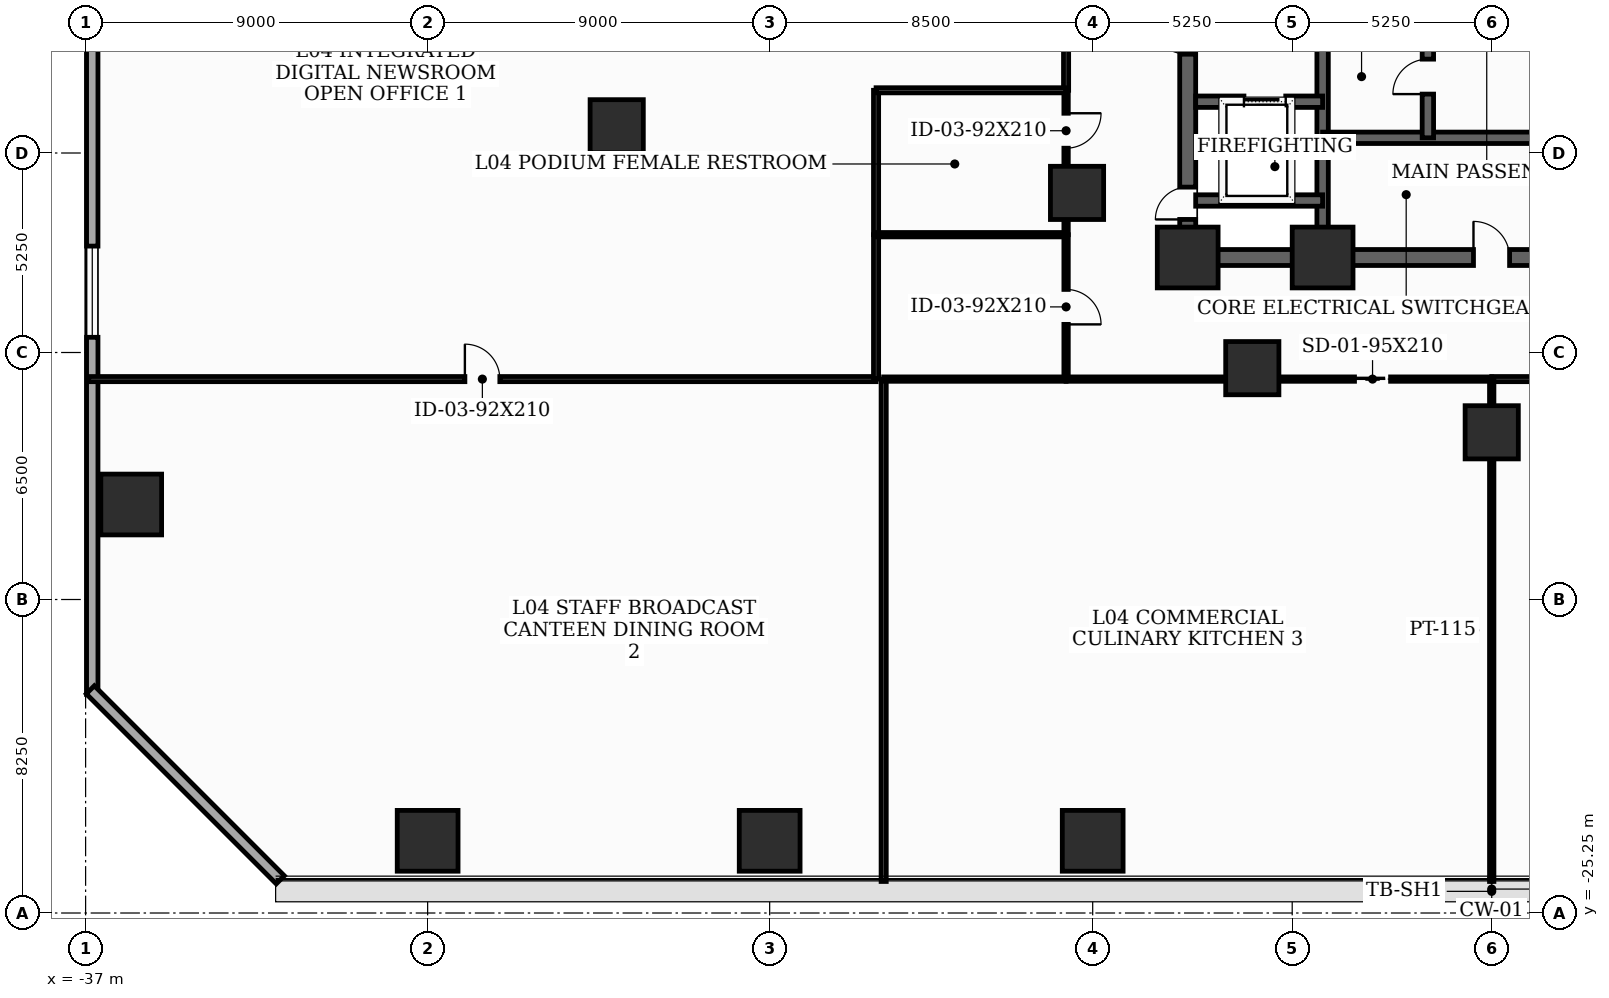
"""IFC4 building model, lengths in metres.
Left out: names, types, materials, properties, quantities, classifications, styles, units other than length and angle.
Written with IfcOpenShell. Run it as: python <this file> out.ifc"""

import sys

from ifc_helpers import new_model, si_unit, direction, frame, frame_2d, origin, origin_2d, place, context, subcontext, project, spatial, rectangle, extrude, element, fill, save


model = new_model("IFC4")
c1 = context("Model", 3, precision=1e-05, world=origin(), true_north=direction((0.0, 1.0)))
c2 = subcontext(c1, "Body", "Model", "MODEL_VIEW")
j1 = project(units=[si_unit("LENGTHUNIT", "METRE"), si_unit("PLANEANGLEUNIT", "RADIAN")], contexts=[c1])
p1 = place(None, origin())
s1 = spatial("IfcSite", under=j1, at=p1, CompositionType="ELEMENT")
p2 = place(p1, origin())
s2 = spatial("IfcBuilding", under=s1, at=p2, CompositionType="ELEMENT")
p3 = place(p2, frame((0.0, 0.0, 20.8)))
s3 = spatial("IfcBuildingStorey", under=s2, at=p3, CompositionType="ELEMENT", Elevation=20.8)
for number, where, z_axis, x_axis in (
    (1, (-8.0, -8.0, 0.0), (0.0, 0.0, 1.0), (1.0, 0.0, 0.0)),
    (2, (-4.45, -8.0, 0.0), (0.0, 0.0, 1.0), (1.0, 0.0, 0.0)),
):
    element("IfcColumn", number, at=place(p3, frame(where, z_axis=z_axis, x_axis=x_axis)), inside=s3, PredefinedType="COLUMN", context=c2, shape_type="SweptSolid", body=[
        extrude(rectangle(XDim=1.6, YDim=1.6, at=origin_2d()), origin(), (0.0, 0.0, 1.0), 5.2),
    ])
for number, where, z_axis, x_axis in (
    (3, (-10.912, -6.3, 0.0), (0.0, 0.0, 1.0), (1.0, 0.0, 0.0)),
    (4, (-6.3, -10.912, 0.0), (0.0, 0.0, 1.0), (1.0, 0.0, 0.0)),
    (5, (0.0, -12.6, 0.0), (0.0, 0.0, 1.0), (1.0, 0.0, 0.0)),
):
    element("IfcColumn", number, at=place(p3, frame(where, z_axis=z_axis, x_axis=x_axis)), inside=s3, PredefinedType="COLUMN", context=c2, shape_type="SweptSolid", body=[
        extrude(rectangle(XDim=1.4, YDim=1.4, at=origin_2d()), origin(), (0.0, 0.0, 1.0), 5.2),
    ])
for number, where, z_axis, x_axis in (
    (6, (-28.0, -23.35, 0.0), (0.0, 0.0, 1.0), (1.0, 0.0, 0.0)),
    (7, (-19.0, -23.35, 0.0), (0.0, 0.0, 1.0), (1.0, 0.0, 0.0)),
    (8, (-10.5, -23.35, 0.0), (0.0, 0.0, 1.0), (1.0, 0.0, 0.0)),
    (9, (-35.8, -14.5, 0.0), (0.0, 0.0, 1.0), (1.0, 0.0, 0.0)),
):
    element("IfcColumn", number, at=place(p3, frame(where, z_axis=z_axis, x_axis=x_axis)), inside=s3, PredefinedType="COLUMN", context=c2, shape_type="SweptSolid", body=[
        extrude(rectangle(XDim=1.6, YDim=1.6, at=origin_2d()), origin(), (0.0, 0.0, 1.0), 5.2),
    ])
p4 = place(p3, frame((-23.025, -4.547, 0.0), z_axis=(0.0, 0.0, 1.0), x_axis=(1.0, 0.0, 0.0)))
e10 = element("IfcColumn", 10, at=p4, inside=s3, PredefinedType="COLUMN", context=c2, shape_type="SweptSolid", body=[
    extrude(rectangle(XDim=1.4, YDim=1.4, at=origin_2d()), origin(), (0.0, 0.0, 1.0), 5.2),
])
p5 = place(p3, frame((-36.825, 28.5, 0.0), z_axis=(0.0, 0.0, 1.0), x_axis=(0.0, -1.0, 0.0)))
e11 = element("IfcWall", 11, at=p5, inside=s3, PredefinedType="SOLIDWALL", context=c2, shape_type="SweptSolid", body=[
    extrude(rectangle(XDim=48.0, YDim=0.3, at=frame_2d((24.0, 0.0))), origin(), (0.0, 0.0, 1.0), 4.94),
])
p6 = place(p5, frame((6.2, 0.0, 0.9)))
e12 = element("IfcOpeningElement", 12, at=p6, cuts=e11, PredefinedType="OPENING", context=c2, shape_type="SweptSolid", body=[
    extrude(rectangle(XDim=2.4, YDim=1.35, at=frame_2d((1.2, 0.675))), frame((0.0, 0.16, 0.0), z_axis=(0.0, -1.0, 0.0), x_axis=(1.0, 0.0, 0.0)), (0.0, 0.0, 1.0), 0.32),
])
p7 = place(p5, frame((19.2, 0.0, 0.9)))
e13 = element("IfcOpeningElement", 13, at=p7, cuts=e11, PredefinedType="OPENING", context=c2, shape_type="SweptSolid", body=[
    extrude(rectangle(XDim=1.8, YDim=1.35, at=frame_2d((0.9, 0.675))), frame((0.0, 0.16, 0.0), z_axis=(0.0, -1.0, 0.0), x_axis=(1.0, 0.0, 0.0)), (0.0, 0.0, 1.0), 0.32),
])
p8 = place(p5, frame((36.2, 0.0, 0.9)))
e14 = element("IfcOpeningElement", 14, at=p8, cuts=e11, PredefinedType="OPENING", context=c2, shape_type="SweptSolid", body=[
    extrude(rectangle(XDim=2.4, YDim=1.35, at=frame_2d((1.2, 0.675))), frame((0.0, 0.16, 0.0), z_axis=(0.0, -1.0, 0.0), x_axis=(1.0, 0.0, 0.0)), (0.0, 0.0, 1.0), 0.32),
])
p9 = place(p3, frame((-36.876, -19.376, 0.0), z_axis=(0.0, 0.0, 1.0), x_axis=(0.707106781187, -0.707106781187, 0.0)))
e15 = element("IfcWall", 15, at=p9, inside=s3, PredefinedType="SOLIDWALL", context=c2, shape_type="SweptSolid", body=[
    extrude(rectangle(XDim=7.071, YDim=0.3, at=frame_2d((3.536, 0.0))), origin(), (0.0, 0.0, 1.0), 4.94),
])
p10 = place(p3, frame((-8.0, -8.0, 0.0), z_axis=(0.0, 0.0, 1.0), x_axis=(0.0, 1.0, 0.0)))
e16 = element("IfcWall", 16, at=p10, inside=s3, PredefinedType="SHEAR", context=c2, shape_type="SweptSolid", body=[
    extrude(rectangle(XDim=16.0, YDim=0.42, at=frame_2d((8.0, 0.0))), origin(), (0.0, 0.0, 1.0), 4.94),
])
p11 = place(p10, frame((1.002, 0.0, 0.0)))
e17 = element("IfcOpeningElement", 17, at=p11, cuts=e16, PredefinedType="OPENING", context=c2, shape_type="SweptSolid", body=[
    extrude(rectangle(XDim=0.85, YDim=2.02, at=frame_2d((0.425, 1.01))), frame((0.0, 0.22, 0.0), z_axis=(0.0, -1.0, 0.0), x_axis=(1.0, 0.0, 0.0)), (0.0, 0.0, 1.0), 0.44),
])
p12 = place(p10, frame((5.35, 0.0, 0.0)))
e18 = element("IfcOpeningElement", 18, at=p12, cuts=e16, PredefinedType="OPENING", context=c2, shape_type="SweptSolid", body=[
    extrude(rectangle(XDim=1.05, YDim=2.15, at=frame_2d((0.525, 1.075))), frame((0.0, 0.22, 0.0), z_axis=(0.0, -1.0, 0.0), x_axis=(1.0, 0.0, 0.0)), (0.0, 0.0, 1.0), 0.44),
])
p13 = place(p3, frame((-8.0, -8.0, 0.0), z_axis=(0.0, 0.0, 1.0), x_axis=(1.0, 0.0, 0.0)))
e19 = element("IfcWall", 19, at=p13, inside=s3, PredefinedType="SHEAR", context=c2, shape_type="SweptSolid", body=[
    extrude(rectangle(XDim=16.0, YDim=0.42, at=frame_2d((8.0, 0.0))), origin(), (0.0, 0.0, 1.0), 4.94),
])
p14 = place(p13, frame((7.52, 0.0, 0.0)))
e20 = element("IfcOpeningElement", 20, at=p14, cuts=e19, PredefinedType="OPENING", context=c2, shape_type="SweptSolid", body=[
    extrude(rectangle(XDim=0.95, YDim=2.1, at=frame_2d((0.475, 1.05))), frame((0.0, 0.22, 0.0), z_axis=(0.0, -1.0, 0.0), x_axis=(1.0, 0.0, 0.0)), (0.0, 0.0, 1.0), 0.44),
])
p15 = place(p3, frame((-4.45, -7.79, 0.0), z_axis=(0.0, 0.0, 1.0), x_axis=(0.0, 1.0, 0.0)))
e21 = element("IfcWall", 21, at=p15, inside=s3, PredefinedType="SHEAR", context=c2, shape_type="SweptSolid", body=[
    extrude(rectangle(XDim=15.58, YDim=0.3, at=frame_2d((7.79, 0.0))), origin(), (0.0, 0.0, 1.0), 4.94),
])
p16 = place(p3, frame((-7.79, -3.9, 0.0), z_axis=(0.0, 0.0, 1.0), x_axis=(1.0, 0.0, 0.0)))
e22 = element("IfcWall", 22, at=p16, inside=s3, PredefinedType="SHEAR", context=c2, shape_type="SweptSolid", body=[
    extrude(rectangle(XDim=3.34, YDim=0.3, at=frame_2d((1.67, 0.0))), origin(), (0.0, 0.0, 1.0), 4.94),
])
p17 = place(p16, frame((1.27, 0.0, 0.0)))
e23 = element("IfcOpeningElement", 23, at=p17, cuts=e22, PredefinedType="OPENING", context=c2, shape_type="SweptSolid", body=[
    extrude(rectangle(XDim=1.1, YDim=2.1, at=frame_2d((0.55, 1.05))), frame((0.0, 0.16, 0.0), z_axis=(0.0, -1.0, 0.0), x_axis=(1.0, 0.0, 0.0)), (0.0, 0.0, 1.0), 0.32),
])
p18 = place(p3, frame((-7.79, -6.5, 0.0), z_axis=(0.0, 0.0, 1.0), x_axis=(1.0, 0.0, 0.0)))
e24 = element("IfcWall", 24, at=p18, inside=s3, PredefinedType="SHEAR", context=c2, shape_type="SweptSolid", body=[
    extrude(rectangle(XDim=3.34, YDim=0.3, at=frame_2d((1.67, 0.0))), origin(), (0.0, 0.0, 1.0), 4.94),
])
p19 = place(p3, frame((-4.45, -4.85, 0.0), z_axis=(0.0, 0.0, 1.0), x_axis=(1.0, 0.0, 0.0)))
e25 = element("IfcWall", 25, at=p19, inside=s3, PredefinedType="SHEAR", context=c2, shape_type="SweptSolid", body=[
    extrude(rectangle(XDim=8.9, YDim=0.3, at=frame_2d((4.45, 0.0))), origin(), (0.0, 0.0, 1.0), 4.94),
])
p20 = place(p3, frame((-1.68, -4.85, 0.0), z_axis=(0.0, 0.0, 1.0), x_axis=(0.0, 1.0, 0.0)))
e26 = element("IfcWall", 26, at=p20, inside=s3, PredefinedType="SHEAR", context=c2, shape_type="SweptSolid", body=[
    extrude(rectangle(XDim=12.64, YDim=0.3, at=frame_2d((6.32, 0.0))), origin(), (0.0, 0.0, 1.0), 4.94),
])
p21 = place(p20, frame((3.95, 0.0, 0.0)))
e27 = element("IfcOpeningElement", 27, at=p21, cuts=e26, PredefinedType="OPENING", context=c2, shape_type="SweptSolid", body=[
    extrude(rectangle(XDim=1.1, YDim=2.1, at=frame_2d((0.55, 1.05))), frame((0.0, 0.16, 0.0), z_axis=(0.0, -1.0, 0.0), x_axis=(1.0, 0.0, 0.0)), (0.0, 0.0, 1.0), 0.32),
])
p22 = place(p20, frame((6.25, 0.0, 0.0)))
e28 = element("IfcOpeningElement", 28, at=p22, cuts=e26, PredefinedType="OPENING", context=c2, shape_type="SweptSolid", body=[
    extrude(rectangle(XDim=1.1, YDim=2.1, at=frame_2d((0.55, 1.05))), frame((0.0, 0.16, 0.0), z_axis=(0.0, -1.0, 0.0), x_axis=(1.0, 0.0, 0.0)), (0.0, 0.0, 1.0), 0.32),
])
p23 = place(p20, frame((8.55, 0.0, 0.0)))
e29 = element("IfcOpeningElement", 29, at=p23, cuts=e26, PredefinedType="OPENING", context=c2, shape_type="SweptSolid", body=[
    extrude(rectangle(XDim=1.1, YDim=2.1, at=frame_2d((0.55, 1.05))), frame((0.0, 0.16, 0.0), z_axis=(0.0, -1.0, 0.0), x_axis=(1.0, 0.0, 0.0)), (0.0, 0.0, 1.0), 0.32),
])
p24 = place(p20, frame((10.85, 0.0, 0.0)))
e30 = element("IfcOpeningElement", 30, at=p24, cuts=e26, PredefinedType="OPENING", context=c2, shape_type="SweptSolid", body=[
    extrude(rectangle(XDim=1.1, YDim=2.1, at=frame_2d((0.55, 1.05))), frame((0.0, 0.16, 0.0), z_axis=(0.0, -1.0, 0.0), x_axis=(1.0, 0.0, 0.0)), (0.0, 0.0, 1.0), 0.32),
])
p25 = place(p20, frame((1.15, 0.0, 0.0)))
e31 = element("IfcOpeningElement", 31, at=p25, cuts=e26, PredefinedType="OPENING", context=c2, shape_type="SweptSolid", body=[
    extrude(rectangle(XDim=0.92, YDim=2.1, at=frame_2d((0.46, 1.05))), frame((0.0, 0.16, 0.0), z_axis=(0.0, -1.0, 0.0), x_axis=(1.0, 0.0, 0.0)), (0.0, 0.0, 1.0), 0.32),
])
p26 = place(p3, frame((-11.2, 4.3, 0.0), z_axis=(0.0, 0.0, 1.0), x_axis=(0.0, -1.0, 0.0)))
e32 = element("IfcWall", 32, at=p26, inside=s3, PredefinedType="PARTITIONING", context=c2, shape_type="SweptSolid", body=[
    extrude(rectangle(XDim=7.9, YDim=0.135, at=frame_2d((3.95, 0.0))), origin(), (0.0, 0.0, 1.0), 3.525),
])
p27 = place(p3, frame((-11.2, -3.6, 0.0), z_axis=(0.0, 0.0, 1.0), x_axis=(0.0, -1.0, 0.0)))
e33 = element("IfcWall", 33, at=p27, inside=s3, PredefinedType="PARTITIONING", context=c2, shape_type="SweptSolid", body=[
    extrude(rectangle(XDim=3.8, YDim=0.115, at=frame_2d((1.9, 0.0))), origin(), (0.0, 0.0, 1.0), 3.525),
])
p28 = place(p27, frame((0.604, 0.0, 0.0)))
e34 = element("IfcOpeningElement", 34, at=p28, cuts=e33, PredefinedType="OPENING", context=c2, shape_type="SweptSolid", body=[
    extrude(rectangle(XDim=0.92, YDim=2.1, at=frame_2d((0.46, 1.05))), frame((0.0, 0.067, 0.0), z_axis=(0.0, -1.0, 0.0), x_axis=(1.0, 0.0, 0.0)), (0.0, 0.0, 1.0), 0.135),
])
p29 = place(p3, frame((-11.2, -7.4, 0.0), z_axis=(0.0, 0.0, 1.0), x_axis=(0.0, -1.0, 0.0)))
e35 = element("IfcWall", 35, at=p29, inside=s3, PredefinedType="PARTITIONING", context=c2, shape_type="SweptSolid", body=[
    extrude(rectangle(XDim=3.8, YDim=0.115, at=frame_2d((1.9, 0.0))), origin(), (0.0, 0.0, 1.0), 4.94),
])
p30 = place(p29, frame((1.44, 0.0, 0.0)))
e36 = element("IfcOpeningElement", 36, at=p30, cuts=e35, PredefinedType="OPENING", context=c2, shape_type="SweptSolid", body=[
    extrude(rectangle(XDim=0.92, YDim=2.1, at=frame_2d((0.46, 1.05))), frame((0.0, 0.067, 0.0), z_axis=(0.0, -1.0, 0.0), x_axis=(1.0, 0.0, 0.0)), (0.0, 0.0, 1.0), 0.135),
])
p31 = place(p3, frame((-11.2, -11.2, 0.0), z_axis=(0.0, 0.0, 1.0), x_axis=(1.0, 0.0, 0.0)))
e37 = element("IfcWall", 37, at=p31, inside=s3, PredefinedType="PARTITIONING", context=c2, shape_type="SweptSolid", body=[
    extrude(rectangle(XDim=11.2, YDim=0.115, at=frame_2d((5.6, 0.0))), origin(), (0.0, 0.0, 1.0), 3.525),
])
p32 = place(p31, frame((7.589, 0.0, 0.0)))
e38 = element("IfcOpeningElement", 38, at=p32, cuts=e37, PredefinedType="OPENING", context=c2, shape_type="SweptSolid", body=[
    extrude(rectangle(XDim=0.95, YDim=2.1, at=frame_2d((0.475, 1.05))), frame((0.0, 0.067, 0.0), z_axis=(0.0, -1.0, 0.0), x_axis=(1.0, 0.0, 0.0)), (0.0, 0.0, 1.0), 0.135),
])
p33 = place(p3, frame((0.0, -11.2, 0.0), z_axis=(0.0, 0.0, 1.0), x_axis=(1.0, 0.0, 0.0)))
e39 = element("IfcWall", 39, at=p33, inside=s3, PredefinedType="PARTITIONING", context=c2, shape_type="SweptSolid", body=[
    extrude(rectangle(XDim=11.2, YDim=0.135, at=frame_2d((5.6, 0.0))), origin(), (0.0, 0.0, 1.0), 3.525),
])
p34 = place(p33, frame((2.336, 0.0, 0.0)))
e40 = element("IfcOpeningElement", 40, at=p34, cuts=e39, PredefinedType="OPENING", context=c2, shape_type="SweptSolid", body=[
    extrude(rectangle(XDim=1.6, YDim=2.15, at=frame_2d((0.8, 1.075))), frame((0.0, 0.077, 0.0), z_axis=(0.0, -1.0, 0.0), x_axis=(1.0, 0.0, 0.0)), (0.0, 0.0, 1.0), 0.155),
])
p35 = place(p3, frame((-16.2, -7.4, 0.0), z_axis=(0.0, 0.0, 1.0), x_axis=(0.0, 1.0, 0.0)))
e41 = element("IfcWall", 41, at=p35, inside=s3, PredefinedType="PARTITIONING", context=c2, shape_type="SweptSolid", body=[
    extrude(rectangle(XDim=3.8, YDim=0.135, at=frame_2d((1.9, 0.0))), origin(), (0.0, 0.0, 1.0), 3.525),
])
p36 = place(p3, frame((-16.2, -3.6, 0.0), z_axis=(0.0, 0.0, 1.0), x_axis=(1.0, 0.0, 0.0)))
e42 = element("IfcWall", 42, at=p36, inside=s3, PredefinedType="PARTITIONING", context=c2, shape_type="SweptSolid", body=[
    extrude(rectangle(XDim=5.0, YDim=0.135, at=frame_2d((2.5, 0.0))), origin(), (0.0, 0.0, 1.0), 3.525),
])
p37 = place(p3, frame((-36.92, -11.2, 0.0), z_axis=(0.0, 0.0, 1.0), x_axis=(1.0, 0.0, 0.0)))
e43 = element("IfcWall", 43, at=p37, inside=s3, PredefinedType="PARTITIONING", context=c2, shape_type="SweptSolid", body=[
    extrude(rectangle(XDim=20.72, YDim=0.135, at=frame_2d((10.36, 0.0))), origin(), (0.0, 0.0, 1.0), 3.425),
])
p38 = place(p37, frame((9.9, 0.0, 0.0)))
e44 = element("IfcOpeningElement", 44, at=p38, cuts=e43, PredefinedType="OPENING", context=c2, shape_type="SweptSolid", body=[
    extrude(rectangle(XDim=0.92, YDim=2.1, at=frame_2d((0.46, 1.05))), frame((0.0, 0.077, 0.0), z_axis=(0.0, -1.0, 0.0), x_axis=(1.0, 0.0, 0.0)), (0.0, 0.0, 1.0), 0.155),
])
p39 = place(p3, frame((-16.2, -11.2, 0.0), z_axis=(0.0, 0.0, 1.0), x_axis=(0.0, 1.0, 0.0)))
e45 = element("IfcWall", 45, at=p39, inside=s3, PredefinedType="PARTITIONING", context=c2, shape_type="SweptSolid", body=[
    extrude(rectangle(XDim=3.8, YDim=0.135, at=frame_2d((1.9, 0.0))), origin(), (0.0, 0.0, 1.0), 4.94),
])
p40 = place(p3, frame((-16.2, -7.4, 0.0), z_axis=(0.0, 0.0, 1.0), x_axis=(1.0, 0.0, 0.0)))
e46 = element("IfcWall", 46, at=p40, inside=s3, PredefinedType="PARTITIONING", context=c2, shape_type="SweptSolid", body=[
    extrude(rectangle(XDim=5.0, YDim=0.115, at=frame_2d((2.5, 0.0))), origin(), (0.0, 0.0, 1.0), 4.94),
])
p41 = place(p3, frame((-16.0, -24.42, 0.0), z_axis=(0.0, 0.0, 1.0), x_axis=(0.0, 1.0, 0.0)))
e47 = element("IfcWall", 47, at=p41, inside=s3, PredefinedType="PARTITIONING", context=c2, shape_type="SweptSolid", body=[
    extrude(rectangle(XDim=13.22, YDim=0.135, at=frame_2d((6.61, 0.0))), origin(), (0.0, 0.0, 1.0), 3.425),
])
p42 = place(p3, frame((-16.0, -11.2, 0.0), z_axis=(0.0, 0.0, 1.0), x_axis=(1.0, 0.0, 0.0)))
e48 = element("IfcWall", 48, at=p42, inside=s3, PredefinedType="PARTITIONING", context=c2, shape_type="SweptSolid", body=[
    extrude(rectangle(XDim=4.8, YDim=0.115, at=frame_2d((2.4, 0.0))), origin(), (0.0, 0.0, 1.0), 4.94),
])
p43 = place(p3, frame((0.0, -24.42, 0.0), z_axis=(0.0, 0.0, 1.0), x_axis=(0.0, 1.0, 0.0)))
e49 = element("IfcWall", 49, at=p43, inside=s3, PredefinedType="PARTITIONING", context=c2, shape_type="SweptSolid", body=[
    extrude(rectangle(XDim=13.22, YDim=0.115, at=frame_2d((6.61, 0.0))), origin(), (0.0, 0.0, 1.0), 3.425),
])
p44 = place(p8, origin())
e50 = element("IfcWindow", 50, at=p44, inside=s3, PartitioningType="SINGLE_PANEL", PredefinedType="WINDOW", context=c2, shape_type="SweptSolid", body=[
    extrude(rectangle(XDim=2.4, YDim=1.35, at=frame_2d((1.2, 0.675))), frame((0.0, 0.03, 0.0), z_axis=(0.0, -1.0, 0.0), x_axis=(1.0, 0.0, 0.0)), (0.0, 0.0, 1.0), 0.06),
])
fill(e14, e50)
p45 = place(p11, origin())
e51 = element("IfcDoor", 51, at=p45, inside=s3, OperationType="SINGLE_SWING_LEFT", PredefinedType="TRAPDOOR", context=c2, shape_type="SweptSolid", body=[
    extrude(rectangle(XDim=0.85, YDim=2.02, at=frame_2d((0.425, 1.01))), frame((0.0, 0.025, 0.0), z_axis=(0.0, -1.0, 0.0), x_axis=(1.0, 0.0, 0.0)), (0.0, 0.0, 1.0), 0.05),
])
fill(e17, e51)
p46 = place(p12, origin())
e52 = element("IfcDoor", 52, at=p46, inside=s3, OperationType="SINGLE_SWING_RIGHT", PredefinedType="DOOR", context=c2, shape_type="SweptSolid", body=[
    extrude(rectangle(XDim=1.05, YDim=2.15, at=frame_2d((0.525, 1.075))), frame((0.0, 0.025, 0.0), z_axis=(0.0, -1.0, 0.0), x_axis=(1.0, 0.0, 0.0)), (0.0, 0.0, 1.0), 0.05),
])
fill(e18, e52)
p47 = place(p14, origin())
e53 = element("IfcDoor", 53, at=p47, inside=s3, OperationType="SINGLE_SWING_LEFT", PredefinedType="DOOR", context=c2, shape_type="SweptSolid", body=[
    extrude(rectangle(XDim=0.95, YDim=2.1, at=frame_2d((0.475, 1.05))), frame((0.0, 0.025, 0.0), z_axis=(0.0, -1.0, 0.0), x_axis=(1.0, 0.0, 0.0)), (0.0, 0.0, 1.0), 0.05),
])
fill(e20, e53)
p48 = place(p17, origin())
e54 = element("IfcDoor", 54, at=p48, inside=s3, OperationType="SLIDING_TO_LEFT", PredefinedType="DOOR", context=c2, shape_type="SweptSolid", body=[
    extrude(rectangle(XDim=1.1, YDim=2.1, at=frame_2d((0.55, 1.05))), frame((0.0, 0.025, 0.0), z_axis=(0.0, -1.0, 0.0), x_axis=(1.0, 0.0, 0.0)), (0.0, 0.0, 1.0), 0.05),
])
fill(e23, e54)
p49 = place(p25, origin())
e55 = element("IfcDoor", 55, at=p49, inside=s3, OperationType="SINGLE_SWING_LEFT", PredefinedType="DOOR", context=c2, shape_type="SweptSolid", body=[
    extrude(rectangle(XDim=0.92, YDim=2.1, at=frame_2d((0.46, 1.05))), frame((0.0, 0.025, 0.0), z_axis=(0.0, -1.0, 0.0), x_axis=(1.0, 0.0, 0.0)), (0.0, 0.0, 1.0), 0.05),
])
fill(e31, e55)
p50 = place(p28, origin())
e56 = element("IfcDoor", 56, at=p50, inside=s3, OperationType="SINGLE_SWING_LEFT", PredefinedType="DOOR", context=c2, shape_type="SweptSolid", body=[
    extrude(rectangle(XDim=0.92, YDim=2.1, at=frame_2d((0.46, 1.05))), frame((0.0, 0.025, 0.0), z_axis=(0.0, -1.0, 0.0), x_axis=(1.0, 0.0, 0.0)), (0.0, 0.0, 1.0), 0.05),
])
fill(e34, e56)
p51 = place(p30, origin())
e57 = element("IfcDoor", 57, at=p51, inside=s3, OperationType="SINGLE_SWING_RIGHT", PredefinedType="DOOR", context=c2, shape_type="SweptSolid", body=[
    extrude(rectangle(XDim=0.92, YDim=2.1, at=frame_2d((0.46, 1.05))), frame((0.0, 0.025, 0.0), z_axis=(0.0, -1.0, 0.0), x_axis=(1.0, 0.0, 0.0)), (0.0, 0.0, 1.0), 0.05),
])
fill(e36, e57)
p52 = place(p32, origin())
e58 = element("IfcDoor", 58, at=p52, inside=s3, OperationType="SLIDING_TO_LEFT", PredefinedType="DOOR", context=c2, shape_type="SweptSolid", body=[
    extrude(rectangle(XDim=0.95, YDim=2.1, at=frame_2d((0.475, 1.05))), frame((0.0, 0.025, 0.0), z_axis=(0.0, -1.0, 0.0), x_axis=(1.0, 0.0, 0.0)), (0.0, 0.0, 1.0), 0.05),
])
fill(e38, e58)
p53 = place(p38, origin())
e59 = element("IfcDoor", 59, at=p53, inside=s3, OperationType="SINGLE_SWING_LEFT", PredefinedType="DOOR", context=c2, shape_type="SweptSolid", body=[
    extrude(rectangle(XDim=0.92, YDim=2.1, at=frame_2d((0.46, 1.05))), frame((0.0, 0.025, 0.0), z_axis=(0.0, -1.0, 0.0), x_axis=(1.0, 0.0, 0.0)), (0.0, 0.0, 1.0), 0.05),
])
fill(e44, e59)
save(model, sys.argv[1])
